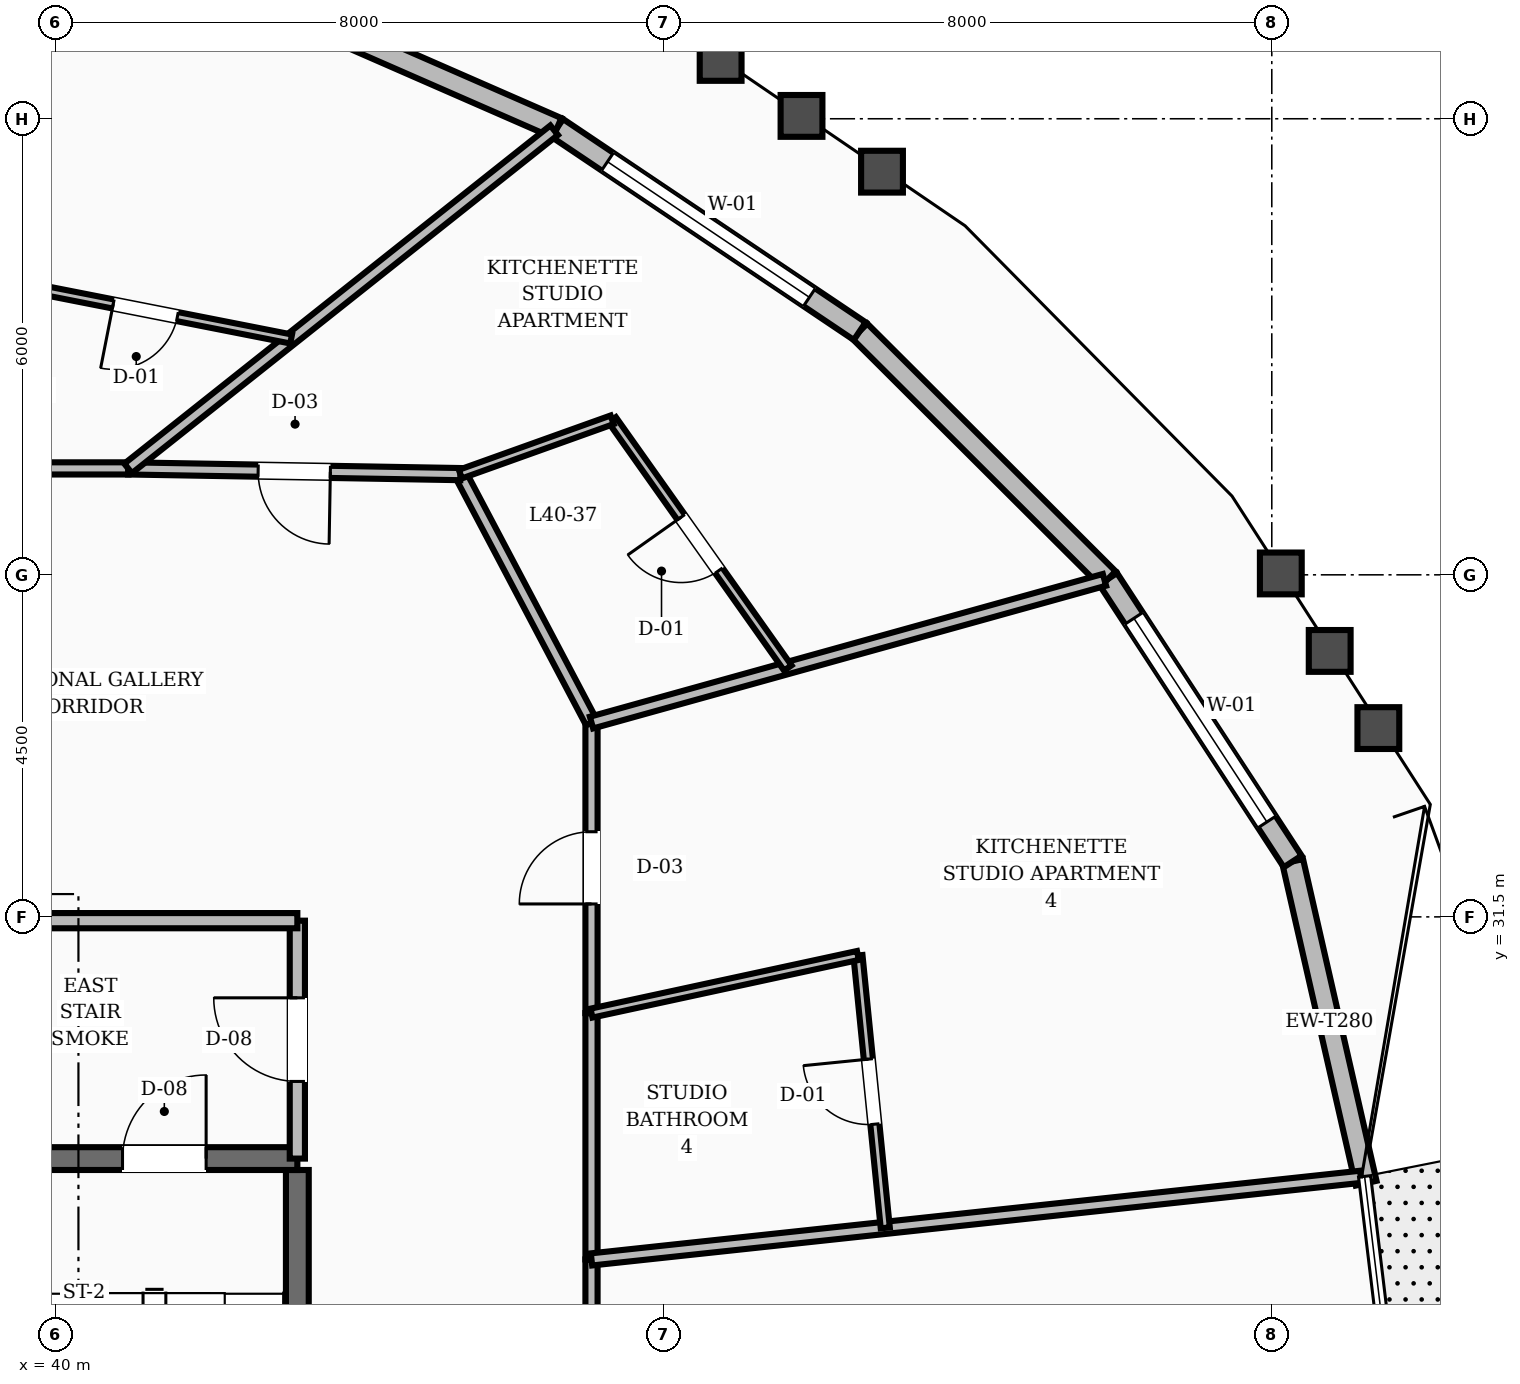
"""IFC4 building model, lengths in metres.
Left out: names, types, materials, properties, quantities, classifications, styles, units other than length and angle.
Written with IfcOpenShell. Run it as: python <this file> out.ifc"""

import sys

from ifc_helpers import new_model, si_unit, direction, frame, frame_2d, origin, place, context, subcontext, project, spatial, rectangle, extrude, element, fill, save


model = new_model("IFC4")
c1 = context("Model", 3, precision=1e-05, world=origin(), true_north=direction((0.0, 1.0)))
c2 = subcontext(c1, "Body", "Model", "MODEL_VIEW")
j1 = project(units=[si_unit("LENGTHUNIT", "METRE"), si_unit("PLANEANGLEUNIT", "RADIAN")], contexts=[c1])
p1 = place(None, origin())
s1 = spatial("IfcSite", under=j1, at=p1, CompositionType="ELEMENT")
p2 = place(p1, origin())
s2 = spatial("IfcBuilding", under=s1, at=p2, CompositionType="ELEMENT")
p3 = place(p2, frame((0.0, 0.0, 156.8)))
s3 = spatial("IfcBuildingStorey", under=s2, at=p3, CompositionType="ELEMENT", Elevation=156.8)
p4 = place(p3, frame((43.18, 19.43, 0.0), z_axis=(0.0, 0.0, 1.0), x_axis=(0.0, 1.0, 0.0)))
e1 = element("IfcWall", 1, at=p4, inside=s3, PredefinedType="SHEAR", context=c2, shape_type="SweptSolid", body=[
    extrude(rectangle(XDim=8.74, YDim=0.3, at=frame_2d((4.37, 0.0))), origin(), (0.0, 0.0, 1.0), 3.6),
])
p5 = place(p3, frame((39.58, 28.32, 0.0), z_axis=(0.0, 0.0, 1.0), x_axis=(1.0, 0.0, 0.0)))
e2 = element("IfcWall", 2, at=p5, inside=s3, PredefinedType="SHEAR", context=c2, shape_type="SweptSolid", body=[
    extrude(rectangle(XDim=3.6, YDim=0.3, at=frame_2d((1.8, 0.0))), origin(), (0.0, 0.0, 1.0), 3.6),
])
p6 = place(p5, frame((1.3, 0.0, 0.0)))
e3 = element("IfcOpeningElement", 3, at=p6, cuts=e2, PredefinedType="OPENING", context=c2, shape_type="SweptSolid", body=[
    extrude(rectangle(XDim=1.1, YDim=2.1, at=frame_2d((0.55, 1.05))), frame((0.0, 0.16, 0.0), z_axis=(0.0, -1.0, 0.0), x_axis=(1.0, 0.0, 0.0)), (0.0, 0.0, 1.0), 0.32),
])
p7 = place(p3, frame((57.241, 27.996, 0.0), z_axis=(0.0, 0.0, 1.0), x_axis=(-0.222546928421, 0.97492197875, 0.0)))
e4 = element("IfcWall", 4, at=p7, inside=s3, PredefinedType="STANDARD", context=c2, shape_type="SweptSolid", body=[
    extrude(rectangle(XDim=4.342, YDim=0.28, at=frame_2d((2.171, 0.0))), origin(), (0.0, 0.0, 1.0), 2.82),
])
p8 = place(p3, frame((56.275, 32.229, 0.0), z_axis=(0.0, 0.0, 1.0), x_axis=(-0.546834521775, 0.83724070959, 0.0)))
e5 = element("IfcWall", 5, at=p8, inside=s3, PredefinedType="STANDARD", context=c2, shape_type="SweptSolid", body=[
    extrude(rectangle(XDim=4.44, YDim=0.28, at=frame_2d((2.22, 0.0))), origin(), (0.0, 0.0, 1.0), 2.82),
])
p9 = place(p8, frame((0.62, 0.0, 0.8)))
e6 = element("IfcOpeningElement", 6, at=p9, cuts=e5, PredefinedType="OPENING", context=c2, shape_type="SweptSolid", body=[
    extrude(rectangle(XDim=3.2, YDim=1.65, at=frame_2d((1.6, 0.825))), frame((0.0, 0.15, 0.0), z_axis=(0.0, -1.0, 0.0), x_axis=(1.0, 0.0, 0.0)), (0.0, 0.0, 1.0), 0.3),
])
p10 = place(p3, frame((53.847, 35.947, 0.0), z_axis=(0.0, 0.0, 1.0), x_axis=(-0.708084852303, 0.706127355326, 0.0)))
e7 = element("IfcWall", 7, at=p10, inside=s3, PredefinedType="STANDARD", context=c2, shape_type="SweptSolid", body=[
    extrude(rectangle(XDim=4.615, YDim=0.28, at=frame_2d((2.307, 0.0))), origin(), (0.0, 0.0, 1.0), 2.82),
])
p11 = place(p3, frame((50.579, 39.206, 0.0), z_axis=(0.0, 0.0, 1.0), x_axis=(-0.830095249601, 0.557621624931, 0.0)))
e8 = element("IfcWall", 8, at=p11, inside=s3, PredefinedType="STANDARD", context=c2, shape_type="SweptSolid", body=[
    extrude(rectangle(XDim=4.796, YDim=0.28, at=frame_2d((2.398, 0.0))), origin(), (0.0, 0.0, 1.0), 2.82),
])
p12 = place(p11, frame((0.798, 0.0, 0.8)))
e9 = element("IfcOpeningElement", 9, at=p12, cuts=e8, PredefinedType="OPENING", context=c2, shape_type="SweptSolid", body=[
    extrude(rectangle(XDim=3.2, YDim=1.65, at=frame_2d((1.6, 0.825))), frame((0.0, 0.15, 0.0), z_axis=(0.0, -1.0, 0.0), x_axis=(1.0, 0.0, 0.0)), (0.0, 0.0, 1.0), 0.3),
])
p13 = place(p3, frame((46.598, 41.88, 0.0), z_axis=(0.0, 0.0, 1.0), x_axis=(-0.916185584373, 0.400754257603, 0.0)))
e10 = element("IfcWall", 10, at=p13, inside=s3, PredefinedType="STANDARD", context=c2, shape_type="SweptSolid", body=[
    extrude(rectangle(XDim=4.958, YDim=0.28, at=frame_2d((2.479, 0.0))), origin(), (0.0, 0.0, 1.0), 2.82),
])
p14 = place(p3, frame((43.18, 28.32, 0.0), z_axis=(0.0, 0.0, 1.0), x_axis=(0.0, 1.0, 0.0)))
e11 = element("IfcWall", 11, at=p14, inside=s3, PredefinedType="SOLIDWALL", context=c2, shape_type="SweptSolid", body=[
    extrude(rectangle(XDim=3.13, YDim=0.2, at=frame_2d((1.565, 0.0))), origin(), (0.0, 0.0, 1.0), 2.8),
])
p15 = place(p14, frame((1.015, 0.0, 0.0)))
e12 = element("IfcOpeningElement", 12, at=p15, cuts=e11, PredefinedType="OPENING", context=c2, shape_type="SweptSolid", body=[
    extrude(rectangle(XDim=1.1, YDim=2.1, at=frame_2d((0.55, 1.05))), frame((0.0, 0.11, 0.0), z_axis=(0.0, -1.0, 0.0), x_axis=(1.0, 0.0, 0.0)), (0.0, 0.0, 1.0), 0.22),
])
p16 = place(p3, frame((39.2, 31.45, 0.0), z_axis=(0.0, 0.0, 1.0), x_axis=(1.0, 0.0, 0.0)))
e13 = element("IfcWall", 13, at=p16, inside=s3, PredefinedType="SOLIDWALL", context=c2, shape_type="SweptSolid", body=[
    extrude(rectangle(XDim=3.98, YDim=0.2, at=frame_2d((1.99, 0.0))), origin(), (0.0, 0.0, 1.0), 2.8),
])
p17 = place(p3, frame((47.05, 24.0, 0.0), z_axis=(0.0, 0.0, 1.0), x_axis=(0.0, 1.0, 0.0)))
e14 = element("IfcWall", 14, at=p17, inside=s3, PredefinedType="SOLIDWALL", context=c2, shape_type="SweptSolid", body=[
    extrude(rectangle(XDim=2.994, YDim=0.16, at=frame_2d((1.497, 0.0))), origin(), (0.0, 0.0, 1.0), 2.8),
])
p18 = place(p17, frame((1.022, 0.0, 0.0)))
e15 = element("IfcOpeningElement", 15, at=p18, cuts=e14, PredefinedType="OPENING", context=c2, shape_type="SweptSolid", body=[
    extrude(rectangle(XDim=0.95, YDim=2.1, at=frame_2d((0.475, 1.05))), frame((0.0, 0.09, 0.0), z_axis=(0.0, -1.0, 0.0), x_axis=(1.0, 0.0, 0.0)), (0.0, 0.0, 1.0), 0.18),
])
p19 = place(p3, frame((47.05, 26.994, 0.0), z_axis=(0.0, 0.0, 1.0), x_axis=(0.0, 1.0, 0.0)))
e16 = element("IfcWall", 16, at=p19, inside=s3, PredefinedType="SOLIDWALL", context=c2, shape_type="SweptSolid", body=[
    extrude(rectangle(XDim=3.24, YDim=0.16, at=frame_2d((1.62, 0.0))), origin(), (0.0, 0.0, 1.0), 2.8),
])
p20 = place(p3, frame((47.05, 30.234, 0.0), z_axis=(0.0, 0.0, 1.0), x_axis=(0.0, 1.0, 0.0)))
e17 = element("IfcWall", 17, at=p20, inside=s3, PredefinedType="SOLIDWALL", context=c2, shape_type="SweptSolid", body=[
    extrude(rectangle(XDim=3.822, YDim=0.16, at=frame_2d((1.911, 0.0))), origin(), (0.0, 0.0, 1.0), 2.8),
])
p21 = place(p20, frame((1.436, 0.0, 0.0)))
e18 = element("IfcOpeningElement", 18, at=p21, cuts=e17, PredefinedType="OPENING", context=c2, shape_type="SweptSolid", body=[
    extrude(rectangle(XDim=0.95, YDim=2.1, at=frame_2d((0.475, 1.05))), frame((0.0, 0.09, 0.0), z_axis=(0.0, -1.0, 0.0), x_axis=(1.0, 0.0, 0.0)), (0.0, 0.0, 1.0), 0.18),
])
p22 = place(p3, frame((47.05, 34.056, 0.0), z_axis=(0.0, 0.0, 1.0), x_axis=(-0.466737093093, 0.884396113702, 0.0)))
e19 = element("IfcWall", 19, at=p22, inside=s3, PredefinedType="SOLIDWALL", context=c2, shape_type="SweptSolid", body=[
    extrude(rectangle(XDim=3.696, YDim=0.16, at=frame_2d((1.848, 0.0))), origin(), (0.0, 0.0, 1.0), 2.8),
])
p23 = place(p3, frame((45.325, 37.325, 0.0), z_axis=(0.0, 0.0, 1.0), x_axis=(-0.999853038912, 0.017143528788, 0.0)))
e20 = element("IfcWall", 20, at=p23, inside=s3, PredefinedType="SOLIDWALL", context=c2, shape_type="SweptSolid", body=[
    extrude(rectangle(XDim=4.372, YDim=0.16, at=frame_2d((2.186, 0.0))), origin(), (0.0, 0.0, 1.0), 2.8),
])
p24 = place(p23, frame((1.711, 0.0, 0.0)))
e21 = element("IfcOpeningElement", 21, at=p24, cuts=e20, PredefinedType="OPENING", context=c2, shape_type="SweptSolid", body=[
    extrude(rectangle(XDim=0.95, YDim=2.1, at=frame_2d((0.475, 1.05))), frame((0.0, 0.09, 0.0), z_axis=(0.0, -1.0, 0.0), x_axis=(1.0, 0.0, 0.0)), (0.0, 0.0, 1.0), 0.18),
])
p25 = place(p3, frame((40.954, 37.4, 0.0), z_axis=(0.0, 0.0, 1.0), x_axis=(-1.0, 0.0, 0.0)))
e22 = element("IfcWall", 22, at=p25, inside=s3, PredefinedType="SOLIDWALL", context=c2, shape_type="SweptSolid", body=[
    extrude(rectangle(XDim=3.403, YDim=0.16, at=frame_2d((1.702, 0.0))), origin(), (0.0, 0.0, 1.0), 2.8),
])
p26 = place(p3, frame((47.05, 26.994, 0.0), z_axis=(0.0, 0.0, 1.0), x_axis=(0.994280445997, 0.106800724287, 0.0)))
e23 = element("IfcWall", 23, at=p26, inside=s3, PredefinedType="SOLIDWALL", context=c2, shape_type="SweptSolid", body=[
    extrude(rectangle(XDim=10.179, YDim=0.16, at=frame_2d((5.09, 0.0))), origin(), (0.0, 0.0, 1.0), 2.8),
])
p27 = place(p3, frame((50.915, 27.409, 0.0), z_axis=(0.0, 0.0, 1.0), x_axis=(-0.099785610451, 0.995008960737, 0.0)))
e24 = element("IfcWall", 24, at=p27, inside=s3, PredefinedType="PARTITIONING", context=c2, shape_type="SweptSolid", body=[
    extrude(rectangle(XDim=3.602, YDim=0.12, at=frame_2d((1.801, 0.0))), origin(), (0.0, 0.0, 1.0), 2.8),
])
p28 = place(p27, frame((1.371, 0.0, 0.0)))
e25 = element("IfcOpeningElement", 25, at=p28, cuts=e24, PredefinedType="OPENING", context=c2, shape_type="SweptSolid", body=[
    extrude(rectangle(XDim=0.86, YDim=2.1, at=frame_2d((0.43, 1.05))), frame((0.0, 0.07, 0.0), z_axis=(0.0, -1.0, 0.0), x_axis=(1.0, 0.0, 0.0)), (0.0, 0.0, 1.0), 0.14),
])
p29 = place(p3, frame((47.05, 30.234, 0.0), z_axis=(0.0, 0.0, 1.0), x_axis=(0.977392118343, 0.211434734613, 0.0)))
e26 = element("IfcWall", 26, at=p29, inside=s3, PredefinedType="PARTITIONING", context=c2, shape_type="SweptSolid", body=[
    extrude(rectangle(XDim=3.586, YDim=0.12, at=frame_2d((1.793, 0.0))), origin(), (0.0, 0.0, 1.0), 2.8),
])
p30 = place(p3, frame((47.05, 34.056, 0.0), z_axis=(0.0, 0.0, 1.0), x_axis=(0.9634039763, 0.268053685758, 0.0)))
e27 = element("IfcWall", 27, at=p30, inside=s3, PredefinedType="SOLIDWALL", context=c2, shape_type="SweptSolid", body=[
    extrude(rectangle(XDim=7.005, YDim=0.16, at=frame_2d((3.502, 0.0))), origin(), (0.0, 0.0, 1.0), 2.8),
])
p31 = place(p3, frame((49.633, 34.775, 0.0), z_axis=(0.0, 0.0, 1.0), x_axis=(-0.577763318474, 0.816204354207, 0.0)))
e28 = element("IfcWall", 28, at=p31, inside=s3, PredefinedType="PARTITIONING", context=c2, shape_type="SweptSolid", body=[
    extrude(rectangle(XDim=4.0, YDim=0.12, at=frame_2d((2.0, 0.0))), origin(), (0.0, 0.0, 1.0), 2.8),
])
p32 = place(p31, frame((1.57, 0.0, 0.0)))
e29 = element("IfcOpeningElement", 29, at=p32, cuts=e28, PredefinedType="OPENING", context=c2, shape_type="SweptSolid", body=[
    extrude(rectangle(XDim=0.86, YDim=2.1, at=frame_2d((0.43, 1.05))), frame((0.0, 0.07, 0.0), z_axis=(0.0, -1.0, 0.0), x_axis=(1.0, 0.0, 0.0)), (0.0, 0.0, 1.0), 0.14),
])
p33 = place(p3, frame((45.325, 37.325, 0.0), z_axis=(0.0, 0.0, 1.0), x_axis=(0.94147594933, 0.33708016381, 0.0)))
e30 = element("IfcWall", 30, at=p33, inside=s3, PredefinedType="PARTITIONING", context=c2, shape_type="SweptSolid", body=[
    extrude(rectangle(XDim=2.121, YDim=0.12, at=frame_2d((1.06, 0.0))), origin(), (0.0, 0.0, 1.0), 2.8),
])
p34 = place(p3, frame((40.954, 37.4, 0.0), z_axis=(0.0, 0.0, 1.0), x_axis=(0.783219810205, 0.621744906616, 0.0)))
e31 = element("IfcWall", 31, at=p34, inside=s3, PredefinedType="SOLIDWALL", context=c2, shape_type="SweptSolid", body=[
    extrude(rectangle(XDim=7.156, YDim=0.16, at=frame_2d((3.578, 0.0))), origin(), (0.0, 0.0, 1.0), 2.8),
])
p35 = place(p3, frame((43.098, 39.103, 0.0), z_axis=(0.0, 0.0, 1.0), x_axis=(-0.981171766557, 0.19313716502, 0.0)))
e32 = element("IfcWall", 32, at=p35, inside=s3, PredefinedType="PARTITIONING", context=c2, shape_type="SweptSolid", body=[
    extrude(rectangle(XDim=3.91, YDim=0.12, at=frame_2d((1.955, 0.0))), origin(), (0.0, 0.0, 1.0), 2.8),
])
p36 = place(p35, frame((1.525, 0.0, 0.0)))
e33 = element("IfcOpeningElement", 33, at=p36, cuts=e32, PredefinedType="OPENING", context=c2, shape_type="SweptSolid", body=[
    extrude(rectangle(XDim=0.86, YDim=2.1, at=frame_2d((0.43, 1.05))), frame((0.0, 0.07, 0.0), z_axis=(0.0, -1.0, 0.0), x_axis=(1.0, 0.0, 0.0)), (0.0, 0.0, 1.0), 0.14),
])
p37 = place(p9, origin())
e34 = element("IfcWindow", 34, at=p37, inside=s3, PartitioningType="SINGLE_PANEL", PredefinedType="WINDOW", context=c2, shape_type="SweptSolid", body=[
    extrude(rectangle(XDim=3.2, YDim=1.65, at=frame_2d((1.6, 0.825))), frame((0.0, 0.03, 0.0), z_axis=(0.0, -1.0, 0.0), x_axis=(1.0, 0.0, 0.0)), (0.0, 0.0, 1.0), 0.06),
])
fill(e6, e34)
p38 = place(p12, origin())
e35 = element("IfcWindow", 35, at=p38, inside=s3, PartitioningType="SINGLE_PANEL", PredefinedType="WINDOW", context=c2, shape_type="SweptSolid", body=[
    extrude(rectangle(XDim=3.2, YDim=1.65, at=frame_2d((1.6, 0.825))), frame((0.0, 0.03, 0.0), z_axis=(0.0, -1.0, 0.0), x_axis=(1.0, 0.0, 0.0)), (0.0, 0.0, 1.0), 0.06),
])
fill(e9, e35)
p39 = place(p6, origin())
e36 = element("IfcDoor", 36, at=p39, inside=s3, OperationType="SINGLE_SWING_RIGHT", PredefinedType="DOOR", context=c2, shape_type="SweptSolid", body=[
    extrude(rectangle(XDim=1.1, YDim=2.1, at=frame_2d((0.55, 1.05))), frame((0.0, 0.025, 0.0), z_axis=(0.0, -1.0, 0.0), x_axis=(1.0, 0.0, 0.0)), (0.0, 0.0, 1.0), 0.05),
])
fill(e3, e36)
p40 = place(p15, origin())
e37 = element("IfcDoor", 37, at=p40, inside=s3, OperationType="SINGLE_SWING_RIGHT", PredefinedType="DOOR", context=c2, shape_type="SweptSolid", body=[
    extrude(rectangle(XDim=1.1, YDim=2.1, at=frame_2d((0.55, 1.05))), frame((0.0, 0.025, 0.0), z_axis=(0.0, -1.0, 0.0), x_axis=(1.0, 0.0, 0.0)), (0.0, 0.0, 1.0), 0.05),
])
fill(e12, e37)
p41 = place(p28, origin())
e38 = element("IfcDoor", 38, at=p41, inside=s3, OperationType="SINGLE_SWING_RIGHT", PredefinedType="DOOR", context=c2, shape_type="SweptSolid", body=[
    extrude(rectangle(XDim=0.86, YDim=2.1, at=frame_2d((0.43, 1.05))), frame((0.0, 0.025, 0.0), z_axis=(0.0, -1.0, 0.0), x_axis=(1.0, 0.0, 0.0)), (0.0, 0.0, 1.0), 0.05),
])
fill(e25, e38)
p42 = place(p21, origin())
e39 = element("IfcDoor", 39, at=p42, inside=s3, OperationType="SINGLE_SWING_LEFT", PredefinedType="DOOR", context=c2, shape_type="SweptSolid", body=[
    extrude(rectangle(XDim=0.95, YDim=2.1, at=frame_2d((0.475, 1.05))), frame((0.0, 0.025, 0.0), z_axis=(0.0, -1.0, 0.0), x_axis=(1.0, 0.0, 0.0)), (0.0, 0.0, 1.0), 0.05),
])
fill(e18, e39)
p43 = place(p32, origin())
e40 = element("IfcDoor", 40, at=p43, inside=s3, OperationType="SINGLE_SWING_RIGHT", PredefinedType="DOOR", context=c2, shape_type="SweptSolid", body=[
    extrude(rectangle(XDim=0.86, YDim=2.1, at=frame_2d((0.43, 1.05))), frame((0.0, 0.025, 0.0), z_axis=(0.0, -1.0, 0.0), x_axis=(1.0, 0.0, 0.0)), (0.0, 0.0, 1.0), 0.05),
])
fill(e29, e40)
p44 = place(p24, origin())
e41 = element("IfcDoor", 41, at=p44, inside=s3, OperationType="SINGLE_SWING_LEFT", PredefinedType="DOOR", context=c2, shape_type="SweptSolid", body=[
    extrude(rectangle(XDim=0.95, YDim=2.1, at=frame_2d((0.475, 1.05))), frame((0.0, 0.025, 0.0), z_axis=(0.0, -1.0, 0.0), x_axis=(1.0, 0.0, 0.0)), (0.0, 0.0, 1.0), 0.05),
])
fill(e21, e41)
p45 = place(p36, origin())
e42 = element("IfcDoor", 42, at=p45, inside=s3, OperationType="SINGLE_SWING_RIGHT", PredefinedType="DOOR", context=c2, shape_type="SweptSolid", body=[
    extrude(rectangle(XDim=0.86, YDim=2.1, at=frame_2d((0.43, 1.05))), frame((0.0, 0.025, 0.0), z_axis=(0.0, -1.0, 0.0), x_axis=(1.0, 0.0, 0.0)), (0.0, 0.0, 1.0), 0.05),
])
fill(e33, e42)
save(model, sys.argv[1])
